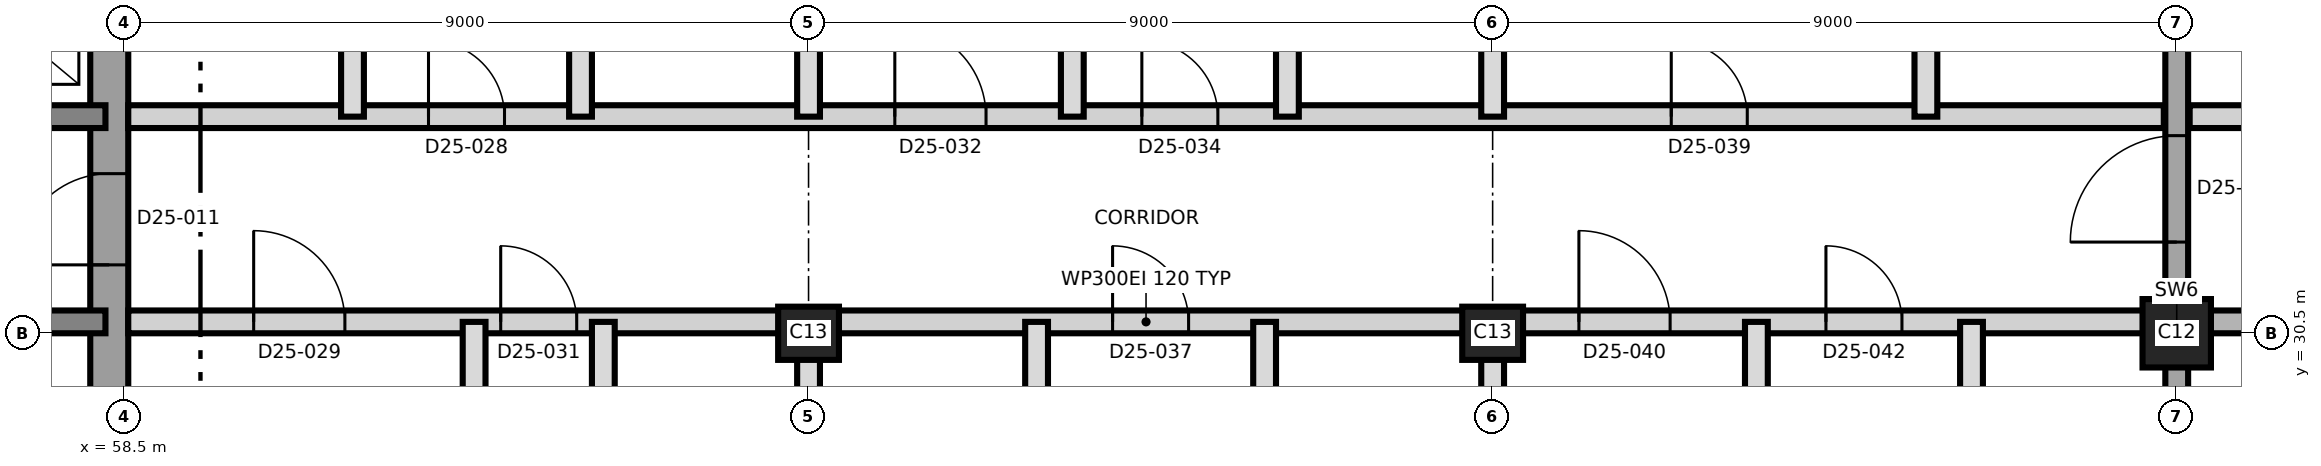
"""IFC4 building model, lengths in metres.
Left out: names, types, materials, properties, quantities, classifications, styles, units other than length and angle.
Written with IfcOpenShell. Run it as: python <this file> out.ifc"""

import sys

from ifc_helpers import new_model, si_unit, direction, frame, frame_2d, origin, origin_2d, place, context, subcontext, project, spatial, rectangle, extrude, element, fill, save


model = new_model("IFC4")
c1 = context("Model", 3, precision=1e-05, world=origin(), true_north=direction((0.0, 1.0)))
c2 = subcontext(c1, "Body", "Model", "MODEL_VIEW")
j1 = project(units=[si_unit("LENGTHUNIT", "METRE"), si_unit("PLANEANGLEUNIT", "RADIAN")], contexts=[c1])
p1 = place(None, origin())
s1 = spatial("IfcSite", under=j1, at=p1, CompositionType="ELEMENT")
p2 = place(p1, origin())
s2 = spatial("IfcBuilding", under=s1, at=p2, CompositionType="ELEMENT")
p3 = place(p2, frame((0.0, 0.0, 229.1)))
s3 = spatial("IfcBuildingStorey", under=s2, at=p3, CompositionType="ELEMENT", Elevation=229.1)
p4 = place(p3, frame((58.3, 21.25, 0.0), z_axis=(0.0, 0.0, 1.0), x_axis=(0.0, 1.0, 0.0)))
e1 = element("IfcWall", 1, at=p4, inside=s3, PredefinedType="SHEAR", context=c2, shape_type="SweptSolid", body=[
    extrude(rectangle(XDim=18.5, YDim=0.5, at=frame_2d((9.25, 0.0))), origin(), (0.0, 0.0, 1.0), 3.7),
])
p5 = place(p4, frame((10.15, 0.0, 0.0)))
e2 = element("IfcOpeningElement", 2, at=p5, cuts=e1, PredefinedType="OPENING", context=c2, shape_type="SweptSolid", body=[
    extrude(rectangle(XDim=1.2, YDim=2.1, at=frame_2d((0.6, 1.05))), frame((0.0, 0.26, 0.0), z_axis=(0.0, -1.0, 0.0), x_axis=(1.0, 0.0, 0.0)), (0.0, 0.0, 1.0), 0.52),
])
p6 = place(p3, frame((31.75, 30.65, 0.0), z_axis=(0.0, 0.0, 1.0), x_axis=(1.0, 0.0, 0.0)))
e3 = element("IfcWall", 3, at=p6, inside=s3, PredefinedType="SHEAR", context=c2, shape_type="SweptSolid", body=[
    extrude(rectangle(XDim=26.5, YDim=0.3, at=frame_2d((13.25, 0.0))), origin(), (0.0, 0.0, 1.0), 3.7),
])
p7 = place(p6, frame((24.75, 0.0, 0.0)))
e4 = element("IfcOpeningElement", 4, at=p7, cuts=e3, PredefinedType="OPENING", context=c2, shape_type="SweptSolid", body=[
    extrude(rectangle(XDim=1.0, YDim=2.1, at=frame_2d((0.5, 1.05))), frame((0.0, 0.16, 0.0), z_axis=(0.0, -1.0, 0.0), x_axis=(1.0, 0.0, 0.0)), (0.0, 0.0, 1.0), 0.32),
])
p8 = place(p6, frame((4.05, 0.0, 0.0)))
e5 = element("IfcOpeningElement", 5, at=p8, cuts=e3, PredefinedType="OPENING", context=c2, shape_type="SweptSolid", body=[
    extrude(rectangle(XDim=1.0, YDim=2.1, at=frame_2d((0.5, 1.05))), frame((0.0, 0.16, 0.0), z_axis=(0.0, -1.0, 0.0), x_axis=(1.0, 0.0, 0.0)), (0.0, 0.0, 1.0), 0.32),
])
p9 = place(p3, frame((31.75, 33.35, 0.0), z_axis=(0.0, 0.0, 1.0), x_axis=(1.0, 0.0, 0.0)))
e6 = element("IfcWall", 6, at=p9, inside=s3, PredefinedType="SHEAR", context=c2, shape_type="SweptSolid", body=[
    extrude(rectangle(XDim=26.5, YDim=0.3, at=frame_2d((13.25, 0.0))), origin(), (0.0, 0.0, 1.0), 3.7),
])
p10 = place(p9, frame((13.9, 0.0, 0.0)))
e7 = element("IfcOpeningElement", 7, at=p10, cuts=e6, PredefinedType="OPENING", context=c2, shape_type="SweptSolid", body=[
    extrude(rectangle(XDim=1.4, YDim=2.1, at=frame_2d((0.7, 1.05))), frame((0.0, 0.16, 0.0), z_axis=(0.0, -1.0, 0.0), x_axis=(1.0, 0.0, 0.0)), (0.0, 0.0, 1.0), 0.32),
])
p11 = place(p9, frame((5.375, 0.0, 0.0)))
e8 = element("IfcOpeningElement", 8, at=p11, cuts=e6, PredefinedType="OPENING", context=c2, shape_type="SweptSolid", body=[
    extrude(rectangle(XDim=1.2, YDim=2.1, at=frame_2d((0.6, 1.05))), frame((0.0, 0.16, 0.0), z_axis=(0.0, -1.0, 0.0), x_axis=(1.0, 0.0, 0.0)), (0.0, 0.0, 1.0), 0.32),
])
p12 = place(p9, frame((19.925, 0.0, 0.0)))
e9 = element("IfcOpeningElement", 9, at=p12, cuts=e6, PredefinedType="OPENING", context=c2, shape_type="SweptSolid", body=[
    extrude(rectangle(XDim=1.2, YDim=2.1, at=frame_2d((0.6, 1.05))), frame((0.0, 0.16, 0.0), z_axis=(0.0, -1.0, 0.0), x_axis=(1.0, 0.0, 0.0)), (0.0, 0.0, 1.0), 0.32),
])
for number, where, z_axis, x_axis in (
    (10, (67.5, 30.5, 0.0), (0.0, 0.0, 1.0), (1.0, 0.0, 0.0)),
    (11, (76.5, 30.5, 0.0), (0.0, 0.0, 1.0), (1.0, 0.0, 0.0)),
):
    element("IfcColumn", number, at=place(p3, frame(where, z_axis=z_axis, x_axis=x_axis)), inside=s3, PredefinedType="COLUMN", context=c2, shape_type="SweptSolid", body=[
        extrude(rectangle(XDim=0.8, YDim=0.7, at=origin_2d()), origin(), (0.0, 0.0, 1.0), 3.7),
    ])
p13 = place(p3, frame((85.5, 30.5, 0.0), z_axis=(0.0, 0.0, 1.0), x_axis=(1.0, 0.0, 0.0)))
e12 = element("IfcColumn", 12, at=p13, inside=s3, PredefinedType="COLUMN", context=c2, shape_type="SweptSolid", body=[
    extrude(rectangle(XDim=0.9, YDim=0.9, at=origin_2d()), origin(), (0.0, 0.0, 1.0), 3.7),
])
p14 = place(p3, frame((85.5, 20.35, 0.0), z_axis=(0.0, 0.0, 1.0), x_axis=(0.0, 1.0, 0.0)))
e13 = element("IfcWall", 13, at=p14, inside=s3, PredefinedType="SHEAR", context=c2, shape_type="SweptSolid", body=[
    extrude(rectangle(XDim=20.3, YDim=0.3, at=frame_2d((10.15, 0.0))), origin(), (0.0, 0.0, 1.0), 3.7),
])
p15 = place(p14, frame((11.35, 0.0, 0.0)))
e14 = element("IfcOpeningElement", 14, at=p15, cuts=e13, PredefinedType="OPENING", context=c2, shape_type="SweptSolid", body=[
    extrude(rectangle(XDim=1.4, YDim=2.1, at=frame_2d((0.7, 1.05))), frame((0.0, 0.16, 0.0), z_axis=(0.0, -1.0, 0.0), x_axis=(1.0, 0.0, 0.0)), (0.0, 0.0, 1.0), 0.32),
])
p16 = place(p3, frame((58.55, 30.65, 0.0), z_axis=(0.0, 0.0, 1.0), x_axis=(1.0, 0.0, 0.0)))
e15 = element("IfcWall", 15, at=p16, inside=s3, PredefinedType="PARTITIONING", context=c2, shape_type="SweptSolid", body=[
    extrude(rectangle(XDim=26.78, YDim=0.3, at=frame_2d((13.39, 0.0))), origin(), (0.0, 0.0, 1.0), 3.4),
])
p17 = place(p16, frame((1.65, 0.0, 0.0)))
e16 = element("IfcOpeningElement", 16, at=p17, cuts=e15, PredefinedType="OPENING", context=c2, shape_type="SweptSolid", body=[
    extrude(rectangle(XDim=1.2, YDim=2.1, at=frame_2d((0.6, 1.05))), frame((0.0, 0.16, 0.0), z_axis=(0.0, -1.0, 0.0), x_axis=(1.0, 0.0, 0.0)), (0.0, 0.0, 1.0), 0.32),
])
p18 = place(p16, frame((4.9, 0.0, 0.0)))
e17 = element("IfcOpeningElement", 17, at=p18, cuts=e15, PredefinedType="OPENING", context=c2, shape_type="SweptSolid", body=[
    extrude(rectangle(XDim=1.0, YDim=2.1, at=frame_2d((0.5, 1.05))), frame((0.0, 0.16, 0.0), z_axis=(0.0, -1.0, 0.0), x_axis=(1.0, 0.0, 0.0)), (0.0, 0.0, 1.0), 0.32),
])
p19 = place(p16, frame((12.95, 0.0, 0.0)))
e18 = element("IfcOpeningElement", 18, at=p19, cuts=e15, PredefinedType="OPENING", context=c2, shape_type="SweptSolid", body=[
    extrude(rectangle(XDim=1.0, YDim=2.4, at=frame_2d((0.5, 1.2))), frame((0.0, 0.16, 0.0), z_axis=(0.0, -1.0, 0.0), x_axis=(1.0, 0.0, 0.0)), (0.0, 0.0, 1.0), 0.32),
])
p20 = place(p16, frame((19.085, 0.0, 0.0)))
e19 = element("IfcOpeningElement", 19, at=p20, cuts=e15, PredefinedType="OPENING", context=c2, shape_type="SweptSolid", body=[
    extrude(rectangle(XDim=1.2, YDim=2.1, at=frame_2d((0.6, 1.05))), frame((0.0, 0.16, 0.0), z_axis=(0.0, -1.0, 0.0), x_axis=(1.0, 0.0, 0.0)), (0.0, 0.0, 1.0), 0.32),
])
p21 = place(p16, frame((22.335, 0.0, 0.0)))
e20 = element("IfcOpeningElement", 20, at=p21, cuts=e15, PredefinedType="OPENING", context=c2, shape_type="SweptSolid", body=[
    extrude(rectangle(XDim=1.0, YDim=2.1, at=frame_2d((0.5, 1.05))), frame((0.0, 0.16, 0.0), z_axis=(0.0, -1.0, 0.0), x_axis=(1.0, 0.0, 0.0)), (0.0, 0.0, 1.0), 0.32),
])
p22 = place(p3, frame((85.67, 30.65, 0.0), z_axis=(0.0, 0.0, 1.0), x_axis=(1.0, 0.0, 0.0)))
e21 = element("IfcWall", 21, at=p22, inside=s3, PredefinedType="SHEAR", context=c2, shape_type="SweptSolid", body=[
    extrude(rectangle(XDim=9.58, YDim=0.3, at=frame_2d((4.79, 0.0))), origin(), (0.0, 0.0, 1.0), 3.4),
])
p23 = place(p22, frame((2.08, 0.0, 0.0)))
e22 = element("IfcOpeningElement", 22, at=p23, cuts=e21, PredefinedType="OPENING", context=c2, shape_type="SweptSolid", body=[
    extrude(rectangle(XDim=1.2, YDim=2.1, at=frame_2d((0.6, 1.05))), frame((0.0, 0.16, 0.0), z_axis=(0.0, -1.0, 0.0), x_axis=(1.0, 0.0, 0.0)), (0.0, 0.0, 1.0), 0.32),
])
p24 = place(p22, frame((5.63, 0.0, 0.0)))
e23 = element("IfcOpeningElement", 23, at=p24, cuts=e21, PredefinedType="OPENING", context=c2, shape_type="SweptSolid", body=[
    extrude(rectangle(XDim=1.0, YDim=2.1, at=frame_2d((0.5, 1.05))), frame((0.0, 0.16, 0.0), z_axis=(0.0, -1.0, 0.0), x_axis=(1.0, 0.0, 0.0)), (0.0, 0.0, 1.0), 0.32),
])
p25 = place(p3, frame((58.55, 33.35, 0.0), z_axis=(0.0, 0.0, 1.0), x_axis=(1.0, 0.0, 0.0)))
e24 = element("IfcWall", 24, at=p25, inside=s3, PredefinedType="PARTITIONING", context=c2, shape_type="SweptSolid", body=[
    extrude(rectangle(XDim=26.78, YDim=0.3, at=frame_2d((13.39, 0.0))), origin(), (0.0, 0.0, 1.0), 3.4),
])
p26 = place(p25, frame((3.95, 0.0, 0.0)))
e25 = element("IfcOpeningElement", 25, at=p26, cuts=e24, PredefinedType="OPENING", context=c2, shape_type="SweptSolid", body=[
    extrude(rectangle(XDim=1.0, YDim=2.4, at=frame_2d((0.5, 1.2))), frame((0.0, 0.16, 0.0), z_axis=(0.0, -1.0, 0.0), x_axis=(1.0, 0.0, 0.0)), (0.0, 0.0, 1.0), 0.32),
])
p27 = place(p25, frame((10.085, 0.0, 0.0)))
e26 = element("IfcOpeningElement", 26, at=p27, cuts=e24, PredefinedType="OPENING", context=c2, shape_type="SweptSolid", body=[
    extrude(rectangle(XDim=1.2, YDim=2.1, at=frame_2d((0.6, 1.05))), frame((0.0, 0.16, 0.0), z_axis=(0.0, -1.0, 0.0), x_axis=(1.0, 0.0, 0.0)), (0.0, 0.0, 1.0), 0.32),
])
p28 = place(p25, frame((13.335, 0.0, 0.0)))
e27 = element("IfcOpeningElement", 27, at=p28, cuts=e24, PredefinedType="OPENING", context=c2, shape_type="SweptSolid", body=[
    extrude(rectangle(XDim=1.0, YDim=2.1, at=frame_2d((0.5, 1.05))), frame((0.0, 0.16, 0.0), z_axis=(0.0, -1.0, 0.0), x_axis=(1.0, 0.0, 0.0)), (0.0, 0.0, 1.0), 0.32),
])
p29 = place(p25, frame((20.3, 0.0, 0.0)))
e28 = element("IfcOpeningElement", 28, at=p29, cuts=e24, PredefinedType="OPENING", context=c2, shape_type="SweptSolid", body=[
    extrude(rectangle(XDim=1.0, YDim=2.4, at=frame_2d((0.5, 1.2))), frame((0.0, 0.16, 0.0), z_axis=(0.0, -1.0, 0.0), x_axis=(1.0, 0.0, 0.0)), (0.0, 0.0, 1.0), 0.32),
])
p30 = place(p3, frame((85.67, 33.35, 0.0), z_axis=(0.0, 0.0, 1.0), x_axis=(1.0, 0.0, 0.0)))
e29 = element("IfcWall", 29, at=p30, inside=s3, PredefinedType="PARTITIONING", context=c2, shape_type="SweptSolid", body=[
    extrude(rectangle(XDim=9.58, YDim=0.3, at=frame_2d((4.79, 0.0))), origin(), (0.0, 0.0, 1.0), 3.4),
])
p31 = place(p30, frame((1.83, 0.0, 0.0)))
e30 = element("IfcOpeningElement", 30, at=p31, cuts=e29, PredefinedType="OPENING", context=c2, shape_type="SweptSolid", body=[
    extrude(rectangle(XDim=1.0, YDim=2.1, at=frame_2d((0.5, 1.05))), frame((0.0, 0.16, 0.0), z_axis=(0.0, -1.0, 0.0), x_axis=(1.0, 0.0, 0.0)), (0.0, 0.0, 1.0), 0.32),
])
p32 = place(p30, frame((5.63, 0.0, 0.0)))
e31 = element("IfcOpeningElement", 31, at=p32, cuts=e29, PredefinedType="OPENING", context=c2, shape_type="SweptSolid", body=[
    extrude(rectangle(XDim=1.0, YDim=2.1, at=frame_2d((0.5, 1.05))), frame((0.0, 0.16, 0.0), z_axis=(0.0, -1.0, 0.0), x_axis=(1.0, 0.0, 0.0)), (0.0, 0.0, 1.0), 0.32),
])
p33 = place(p3, frame((61.5, 33.35, 0.0), z_axis=(0.0, 0.0, 1.0), x_axis=(0.0, 1.0, 0.0)))
e32 = element("IfcWall", 32, at=p33, inside=s3, PredefinedType="PARTITIONING", context=c2, shape_type="SweptSolid", body=[
    extrude(rectangle(XDim=3.3, YDim=0.3, at=frame_2d((1.65, 0.0))), origin(), (0.0, 0.0, 1.0), 3.4),
])
p34 = place(p3, frame((63.1, 20.35, 0.0), z_axis=(0.0, 0.0, 1.0), x_axis=(0.0, 1.0, 0.0)))
e33 = element("IfcWall", 33, at=p34, inside=s3, PredefinedType="PARTITIONING", context=c2, shape_type="SweptSolid", body=[
    extrude(rectangle(XDim=10.3, YDim=0.3, at=frame_2d((5.15, 0.0))), origin(), (0.0, 0.0, 1.0), 3.4),
])
p35 = place(p3, frame((64.5, 33.35, 0.0), z_axis=(0.0, 0.0, 1.0), x_axis=(0.0, 1.0, 0.0)))
e34 = element("IfcWall", 34, at=p35, inside=s3, PredefinedType="PARTITIONING", context=c2, shape_type="SweptSolid", body=[
    extrude(rectangle(XDim=3.3, YDim=0.3, at=frame_2d((1.65, 0.0))), origin(), (0.0, 0.0, 1.0), 3.4),
])
p36 = place(p3, frame((64.8, 27.45, 0.0), z_axis=(0.0, 0.0, 1.0), x_axis=(0.0, 1.0, 0.0)))
e35 = element("IfcWall", 35, at=p36, inside=s3, PredefinedType="PARTITIONING", context=c2, shape_type="SweptSolid", body=[
    extrude(rectangle(XDim=3.2, YDim=0.3, at=frame_2d((1.6, 0.0))), origin(), (0.0, 0.0, 1.0), 3.4),
])
p37 = place(p3, frame((67.5, 20.35, 0.0), z_axis=(0.0, 0.0, 1.0), x_axis=(0.0, 1.0, 0.0)))
e36 = element("IfcWall", 36, at=p37, inside=s3, PredefinedType="PARTITIONING", context=c2, shape_type="SweptSolid", body=[
    extrude(rectangle(XDim=10.3, YDim=0.3, at=frame_2d((5.15, 0.0))), origin(), (0.0, 0.0, 1.0), 3.4),
])
p38 = place(p3, frame((67.5, 33.35, 0.0), z_axis=(0.0, 0.0, 1.0), x_axis=(0.0, 1.0, 0.0)))
e37 = element("IfcWall", 37, at=p38, inside=s3, PredefinedType="PARTITIONING", context=c2, shape_type="SweptSolid", body=[
    extrude(rectangle(XDim=7.48, YDim=0.3, at=frame_2d((3.74, 0.0))), origin(), (0.0, 0.0, 1.0), 3.4),
])
p39 = place(p3, frame((70.5, 27.35, 0.0), z_axis=(0.0, 0.0, 1.0), x_axis=(0.0, 1.0, 0.0)))
e38 = element("IfcWall", 38, at=p39, inside=s3, PredefinedType="PARTITIONING", context=c2, shape_type="SweptSolid", body=[
    extrude(rectangle(XDim=3.3, YDim=0.3, at=frame_2d((1.65, 0.0))), origin(), (0.0, 0.0, 1.0), 3.4),
])
p40 = place(p3, frame((70.97, 33.35, 0.0), z_axis=(0.0, 0.0, 1.0), x_axis=(0.0, 1.0, 0.0)))
e39 = element("IfcWall", 39, at=p40, inside=s3, PredefinedType="PARTITIONING", context=c2, shape_type="SweptSolid", body=[
    extrude(rectangle(XDim=7.48, YDim=0.3, at=frame_2d((3.74, 0.0))), origin(), (0.0, 0.0, 1.0), 3.4),
])
p41 = place(p3, frame((73.5, 27.35, 0.0), z_axis=(0.0, 0.0, 1.0), x_axis=(0.0, 1.0, 0.0)))
e40 = element("IfcWall", 40, at=p41, inside=s3, PredefinedType="PARTITIONING", context=c2, shape_type="SweptSolid", body=[
    extrude(rectangle(XDim=3.3, YDim=0.3, at=frame_2d((1.65, 0.0))), origin(), (0.0, 0.0, 1.0), 3.4),
])
p42 = place(p3, frame((73.8, 33.35, 0.0), z_axis=(0.0, 0.0, 1.0), x_axis=(0.0, 1.0, 0.0)))
e41 = element("IfcWall", 41, at=p42, inside=s3, PredefinedType="PARTITIONING", context=c2, shape_type="SweptSolid", body=[
    extrude(rectangle(XDim=3.2, YDim=0.3, at=frame_2d((1.6, 0.0))), origin(), (0.0, 0.0, 1.0), 3.4),
])
p43 = place(p3, frame((76.5, 20.35, 0.0), z_axis=(0.0, 0.0, 1.0), x_axis=(0.0, 1.0, 0.0)))
e42 = element("IfcWall", 42, at=p43, inside=s3, PredefinedType="PARTITIONING", context=c2, shape_type="SweptSolid", body=[
    extrude(rectangle(XDim=10.3, YDim=0.3, at=frame_2d((5.15, 0.0))), origin(), (0.0, 0.0, 1.0), 3.4),
])
p44 = place(p3, frame((76.5, 33.35, 0.0), z_axis=(0.0, 0.0, 1.0), x_axis=(0.0, 1.0, 0.0)))
e43 = element("IfcWall", 43, at=p44, inside=s3, PredefinedType="PARTITIONING", context=c2, shape_type="SweptSolid", body=[
    extrude(rectangle(XDim=7.48, YDim=0.3, at=frame_2d((3.74, 0.0))), origin(), (0.0, 0.0, 1.0), 3.4),
])
p45 = place(p3, frame((79.97, 20.35, 0.0), z_axis=(0.0, 0.0, 1.0), x_axis=(0.0, 1.0, 0.0)))
e44 = element("IfcWall", 44, at=p45, inside=s3, PredefinedType="PARTITIONING", context=c2, shape_type="SweptSolid", body=[
    extrude(rectangle(XDim=10.3, YDim=0.3, at=frame_2d((5.15, 0.0))), origin(), (0.0, 0.0, 1.0), 3.4),
])
p46 = place(p3, frame((82.2, 33.35, 0.0), z_axis=(0.0, 0.0, 1.0), x_axis=(0.0, 1.0, 0.0)))
e45 = element("IfcWall", 45, at=p46, inside=s3, PredefinedType="PARTITIONING", context=c2, shape_type="SweptSolid", body=[
    extrude(rectangle(XDim=3.5, YDim=0.3, at=frame_2d((1.75, 0.0))), origin(), (0.0, 0.0, 1.0), 3.4),
])
p47 = place(p3, frame((82.8, 27.45, 0.0), z_axis=(0.0, 0.0, 1.0), x_axis=(0.0, 1.0, 0.0)))
e46 = element("IfcWall", 46, at=p47, inside=s3, PredefinedType="PARTITIONING", context=c2, shape_type="SweptSolid", body=[
    extrude(rectangle(XDim=3.2, YDim=0.3, at=frame_2d((1.6, 0.0))), origin(), (0.0, 0.0, 1.0), 3.4),
])
p48 = place(p5, origin())
e47 = element("IfcDoor", 47, at=p48, inside=s3, OperationType="SINGLE_SWING_LEFT", PredefinedType="DOOR", context=c2, shape_type="SweptSolid", body=[
    extrude(rectangle(XDim=1.2, YDim=2.1, at=frame_2d((0.6, 1.05))), frame((0.0, 0.025, 0.0), z_axis=(0.0, -1.0, 0.0), x_axis=(1.0, 0.0, 0.0)), (0.0, 0.0, 1.0), 0.05),
])
fill(e2, e47)
p49 = place(p26, origin())
e48 = element("IfcDoor", 48, at=p49, inside=s3, OperationType="SINGLE_SWING_LEFT", PredefinedType="DOOR", context=c2, shape_type="SweptSolid", body=[
    extrude(rectangle(XDim=1.0, YDim=2.4, at=frame_2d((0.5, 1.2))), frame((0.0, 0.025, 0.0), z_axis=(0.0, -1.0, 0.0), x_axis=(1.0, 0.0, 0.0)), (0.0, 0.0, 1.0), 0.05),
])
fill(e25, e48)
p50 = place(p17, origin())
e49 = element("IfcDoor", 49, at=p50, inside=s3, OperationType="SINGLE_SWING_LEFT", PredefinedType="DOOR", context=c2, shape_type="SweptSolid", body=[
    extrude(rectangle(XDim=1.2, YDim=2.1, at=frame_2d((0.6, 1.05))), frame((0.0, 0.025, 0.0), z_axis=(0.0, -1.0, 0.0), x_axis=(1.0, 0.0, 0.0)), (0.0, 0.0, 1.0), 0.05),
])
fill(e16, e49)
p51 = place(p18, origin())
e50 = element("IfcDoor", 50, at=p51, inside=s3, OperationType="SINGLE_SWING_LEFT", PredefinedType="DOOR", context=c2, shape_type="SweptSolid", body=[
    extrude(rectangle(XDim=1.0, YDim=2.1, at=frame_2d((0.5, 1.05))), frame((0.0, 0.025, 0.0), z_axis=(0.0, -1.0, 0.0), x_axis=(1.0, 0.0, 0.0)), (0.0, 0.0, 1.0), 0.05),
])
fill(e17, e50)
p52 = place(p27, origin())
e51 = element("IfcDoor", 51, at=p52, inside=s3, OperationType="SINGLE_SWING_LEFT", PredefinedType="DOOR", context=c2, shape_type="SweptSolid", body=[
    extrude(rectangle(XDim=1.2, YDim=2.1, at=frame_2d((0.6, 1.05))), frame((0.0, 0.025, 0.0), z_axis=(0.0, -1.0, 0.0), x_axis=(1.0, 0.0, 0.0)), (0.0, 0.0, 1.0), 0.05),
])
fill(e26, e51)
p53 = place(p28, origin())
e52 = element("IfcDoor", 52, at=p53, inside=s3, OperationType="SINGLE_SWING_LEFT", PredefinedType="DOOR", context=c2, shape_type="SweptSolid", body=[
    extrude(rectangle(XDim=1.0, YDim=2.1, at=frame_2d((0.5, 1.05))), frame((0.0, 0.025, 0.0), z_axis=(0.0, -1.0, 0.0), x_axis=(1.0, 0.0, 0.0)), (0.0, 0.0, 1.0), 0.05),
])
fill(e27, e52)
p54 = place(p19, origin())
e53 = element("IfcDoor", 53, at=p54, inside=s3, OperationType="SINGLE_SWING_LEFT", PredefinedType="DOOR", context=c2, shape_type="SweptSolid", body=[
    extrude(rectangle(XDim=1.0, YDim=2.4, at=frame_2d((0.5, 1.2))), frame((0.0, 0.025, 0.0), z_axis=(0.0, -1.0, 0.0), x_axis=(1.0, 0.0, 0.0)), (0.0, 0.0, 1.0), 0.05),
])
fill(e18, e53)
p55 = place(p29, origin())
e54 = element("IfcDoor", 54, at=p55, inside=s3, OperationType="SINGLE_SWING_LEFT", PredefinedType="DOOR", context=c2, shape_type="SweptSolid", body=[
    extrude(rectangle(XDim=1.0, YDim=2.4, at=frame_2d((0.5, 1.2))), frame((0.0, 0.025, 0.0), z_axis=(0.0, -1.0, 0.0), x_axis=(1.0, 0.0, 0.0)), (0.0, 0.0, 1.0), 0.05),
])
fill(e28, e54)
p56 = place(p20, origin())
e55 = element("IfcDoor", 55, at=p56, inside=s3, OperationType="SINGLE_SWING_RIGHT", PredefinedType="DOOR", context=c2, shape_type="SweptSolid", body=[
    extrude(rectangle(XDim=1.2, YDim=2.1, at=frame_2d((0.6, 1.05))), frame((0.0, 0.025, 0.0), z_axis=(0.0, -1.0, 0.0), x_axis=(1.0, 0.0, 0.0)), (0.0, 0.0, 1.0), 0.05),
])
fill(e19, e55)
p57 = place(p21, origin())
e56 = element("IfcDoor", 56, at=p57, inside=s3, OperationType="SINGLE_SWING_LEFT", PredefinedType="DOOR", context=c2, shape_type="SweptSolid", body=[
    extrude(rectangle(XDim=1.0, YDim=2.1, at=frame_2d((0.5, 1.05))), frame((0.0, 0.025, 0.0), z_axis=(0.0, -1.0, 0.0), x_axis=(1.0, 0.0, 0.0)), (0.0, 0.0, 1.0), 0.05),
])
fill(e20, e56)
p58 = place(p15, origin())
e57 = element("IfcDoor", 57, at=p58, inside=s3, OperationType="SINGLE_SWING_RIGHT", PredefinedType="DOOR", context=c2, shape_type="SweptSolid", body=[
    extrude(rectangle(XDim=1.4, YDim=2.1, at=frame_2d((0.7, 1.05))), frame((0.0, 0.025, 0.0), z_axis=(0.0, -1.0, 0.0), x_axis=(1.0, 0.0, 0.0)), (0.0, 0.0, 1.0), 0.05),
])
fill(e14, e57)
save(model, sys.argv[1])
